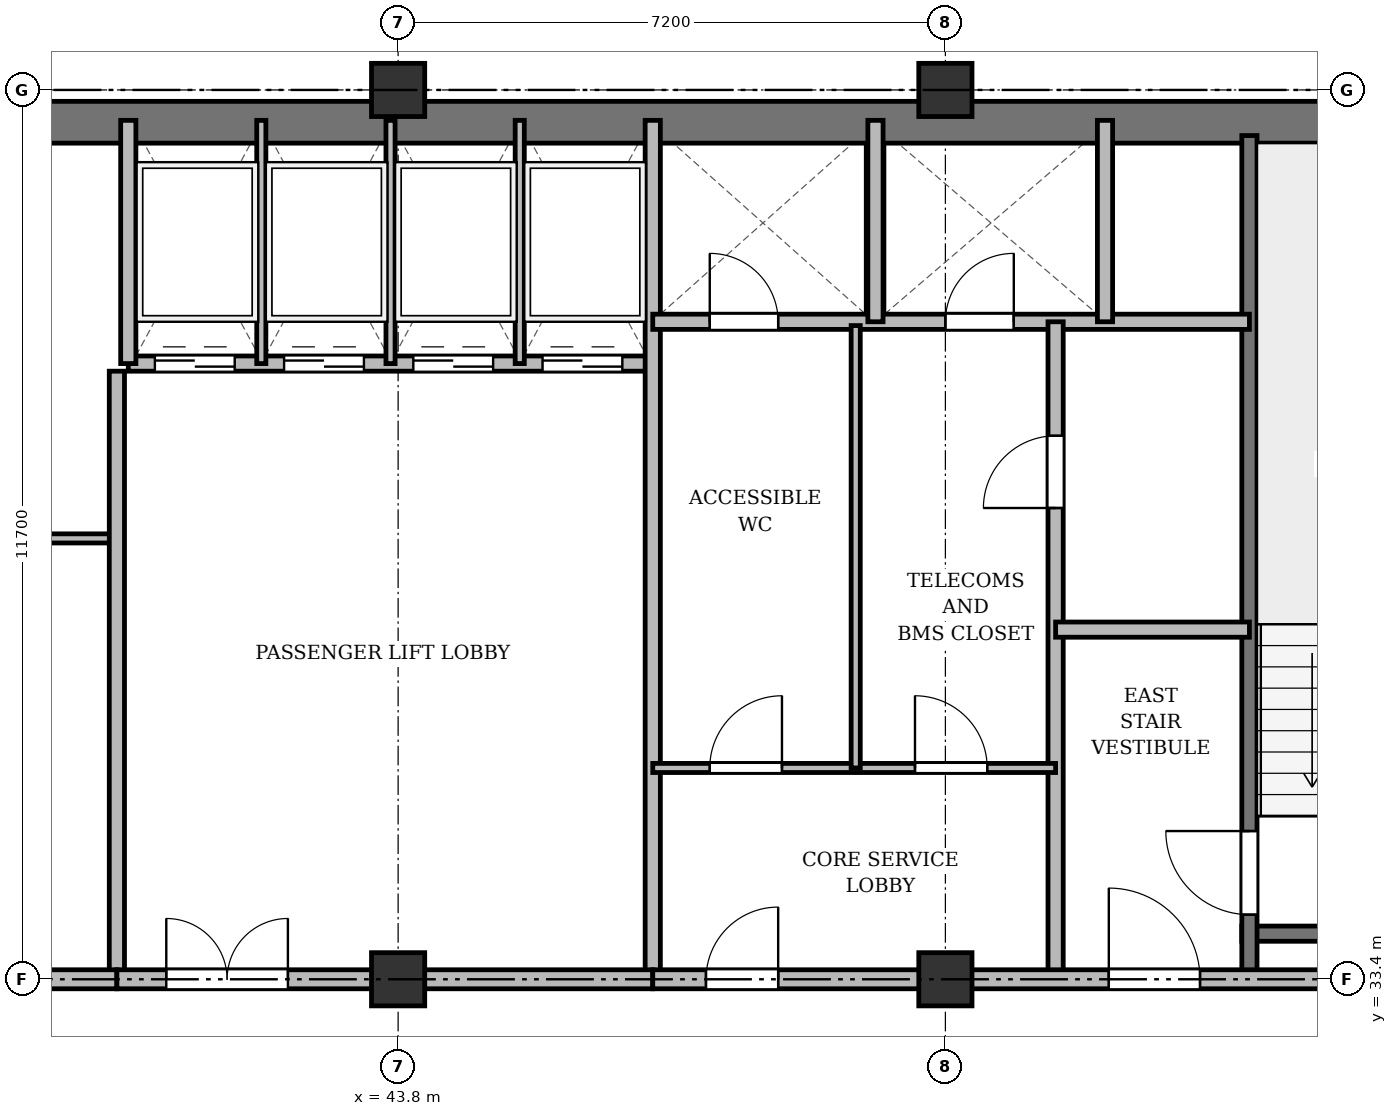
"""IFC4 building model, lengths in metres.
Left out: names, types, materials, properties, quantities, classifications, styles, units other than length and angle.
Written with IfcOpenShell. Run it as: python <this file> out.ifc"""

import sys

from ifc_helpers import new_model, si_unit, direction, frame, frame_2d, origin, origin_2d, place, context, subcontext, project, spatial, rectangle, extrude, source, transform, mapped, element, fill, save


model = new_model("IFC4")
c1 = context("Model", 3, precision=1e-05, world=origin(), true_north=direction((0.0, 1.0)))
c2 = subcontext(c1, "Body", "Model", "MODEL_VIEW")
j1 = project(units=[si_unit("LENGTHUNIT", "METRE"), si_unit("PLANEANGLEUNIT", "RADIAN")], contexts=[c1])
p1 = place(None, origin())
s1 = spatial("IfcSite", under=j1, at=p1, CompositionType="ELEMENT")
p2 = place(p1, origin())
s2 = spatial("IfcBuilding", under=s1, at=p2, CompositionType="ELEMENT")
p3 = place(p2, frame((0.0, 0.0, 233.7)))
s3 = spatial("IfcBuildingStorey", under=s2, at=p3, CompositionType="ELEMENT", Elevation=233.7)
m1 = source(origin(), c2, "Body", "SweptSolid", [
    extrude(rectangle(XDim=0.7, YDim=0.7, at=origin_2d()), origin(), (0.0, 0.0, 1.0), 3.6),
])
for number, where, z_axis, x_axis in (
    (1, (43.8, 33.4, 0.0), (0.0, 0.0, 1.0), (1.0, 0.0, 0.0)),
    (2, (43.8, 45.1, 0.0), (0.0, 0.0, 1.0), (1.0, 0.0, 0.0)),
    (3, (51.0, 33.4, 0.0), (0.0, 0.0, 1.0), (1.0, 0.0, 0.0)),
    (4, (51.0, 45.1, 0.0), (0.0, 0.0, 1.0), (1.0, 0.0, 0.0)),
):
    element("IfcColumn", number, at=place(p3, frame(where, z_axis=z_axis, x_axis=x_axis)), inside=s3, PredefinedType="COLUMN", context=c2, shape_type="MappedRepresentation", body=[
        mapped(m1, transform((0.0, 0.0, 0.0), x_axis=(1.0, 0.0, 0.0), y_axis=(0.0, 1.0, 0.0), z_axis=(0.0, 0.0, 1.0), scale=1.0)),
    ])
p4 = place(p3, frame((15.65, 44.675, 0.0), z_axis=(0.0, 0.0, 1.0), x_axis=(1.0, 0.0, 0.0)))
e5 = element("IfcWall", 5, at=p4, inside=s3, PredefinedType="SHEAR", context=c2, shape_type="SweptSolid", body=[
    extrude(rectangle(XDim=43.1, YDim=0.55, at=frame_2d((21.55, 0.0))), origin(), (0.0, 0.0, 1.0), 3.36),
])
p5 = place(p3, frame((54.9, 34.0, 0.0), z_axis=(0.0, 0.0, 1.0), x_axis=(1.0, 0.0, 0.0)))
e6 = element("IfcWall", 6, at=p5, inside=s3, PredefinedType="SHEAR", context=c2, shape_type="SweptSolid", body=[
    extrude(rectangle(XDim=3.4, YDim=0.2, at=frame_2d((1.7, 0.0))), origin(), (0.0, 0.0, 1.0), 3.36),
])
p6 = place(p3, frame((55.0, 33.4, 0.0), z_axis=(0.0, 0.0, 1.0), x_axis=(0.0, 1.0, 0.0)))
e7 = element("IfcWall", 7, at=p6, inside=s3, PredefinedType="SHEAR", context=c2, shape_type="SweptSolid", body=[
    extrude(rectangle(XDim=11.1, YDim=0.2, at=frame_2d((5.55, 0.0))), origin(), (0.0, 0.0, 1.0), 3.36),
])
p7 = place(p6, frame((0.85, 0.0, 0.0)))
e8 = element("IfcOpeningElement", 8, at=p7, cuts=e7, PredefinedType="OPENING", context=c2, shape_type="SweptSolid", body=[
    extrude(rectangle(XDim=1.1, YDim=2.15, at=frame_2d((0.55, 1.075))), frame((0.0, 0.11, 0.0), z_axis=(0.0, -1.0, 0.0), x_axis=(1.0, 0.0, 0.0)), (0.0, 0.0, 1.0), 0.22),
])
p8 = place(p3, frame((33.3, 39.2, 0.0), z_axis=(0.0, 0.0, 1.0), x_axis=(1.0, 0.0, 0.0)))
e9 = element("IfcWall", 9, at=p8, inside=s3, PredefinedType="PARTITIONING", context=c2, shape_type="SweptSolid", body=[
    extrude(rectangle(XDim=6.8, YDim=0.12, at=frame_2d((3.4, 0.0))), origin(), (0.0, 0.0, 1.0), 3.36),
])
p9 = place(p8, frame((2.6, 0.0, 0.0)))
e10 = element("IfcOpeningElement", 10, at=p9, cuts=e9, PredefinedType="OPENING", context=c2, shape_type="SweptSolid", body=[
    extrude(rectangle(XDim=0.95, YDim=2.15, at=frame_2d((0.475, 1.075))), frame((0.0, 0.07, 0.0), z_axis=(0.0, -1.0, 0.0), x_axis=(1.0, 0.0, 0.0)), (0.0, 0.0, 1.0), 0.14),
])
p10 = place(p3, frame((40.1, 33.4, 0.0), z_axis=(0.0, 0.0, 1.0), x_axis=(0.0, 1.0, 0.0)))
e11 = element("IfcWall", 11, at=p10, inside=s3, PredefinedType="SOLIDWALL", context=c2, shape_type="SweptSolid", body=[
    extrude(rectangle(XDim=8.0, YDim=0.2, at=frame_2d((4.0, 0.0))), origin(), (0.0, 0.0, 1.0), 2.91),
])
p11 = place(p3, frame((40.25, 41.5, 0.0), z_axis=(0.0, 0.0, 1.0), x_axis=(1.0, 0.0, 0.0)))
e12 = element("IfcWall", 12, at=p11, inside=s3, PredefinedType="SOLIDWALL", context=c2, shape_type="SweptSolid", body=[
    extrude(rectangle(XDim=6.9, YDim=0.2, at=frame_2d((3.45, 0.0))), origin(), (0.0, 0.0, 1.0), 3.36),
])
p12 = place(p11, frame((0.35, 0.0, 0.0)))
e13 = element("IfcOpeningElement", 13, at=p12, cuts=e12, PredefinedType="OPENING", context=c2, shape_type="SweptSolid", body=[
    extrude(rectangle(XDim=1.05, YDim=2.15, at=frame_2d((0.525, 1.075))), frame((0.0, 0.11, 0.0), z_axis=(0.0, -1.0, 0.0), x_axis=(1.0, 0.0, 0.0)), (0.0, 0.0, 1.0), 0.22),
])
p13 = place(p11, frame((2.05, 0.0, 0.0)))
e14 = element("IfcOpeningElement", 14, at=p13, cuts=e12, PredefinedType="OPENING", context=c2, shape_type="SweptSolid", body=[
    extrude(rectangle(XDim=1.05, YDim=2.15, at=frame_2d((0.525, 1.075))), frame((0.0, 0.11, 0.0), z_axis=(0.0, -1.0, 0.0), x_axis=(1.0, 0.0, 0.0)), (0.0, 0.0, 1.0), 0.22),
])
p14 = place(p11, frame((3.75, 0.0, 0.0)))
e15 = element("IfcOpeningElement", 15, at=p14, cuts=e12, PredefinedType="OPENING", context=c2, shape_type="SweptSolid", body=[
    extrude(rectangle(XDim=1.05, YDim=2.15, at=frame_2d((0.525, 1.075))), frame((0.0, 0.11, 0.0), z_axis=(0.0, -1.0, 0.0), x_axis=(1.0, 0.0, 0.0)), (0.0, 0.0, 1.0), 0.22),
])
p15 = place(p11, frame((5.45, 0.0, 0.0)))
e16 = element("IfcOpeningElement", 16, at=p15, cuts=e12, PredefinedType="OPENING", context=c2, shape_type="SweptSolid", body=[
    extrude(rectangle(XDim=1.05, YDim=2.15, at=frame_2d((0.525, 1.075))), frame((0.0, 0.11, 0.0), z_axis=(0.0, -1.0, 0.0), x_axis=(1.0, 0.0, 0.0)), (0.0, 0.0, 1.0), 0.22),
])
p16 = place(p3, frame((40.25, 41.5, 0.0), z_axis=(0.0, 0.0, 1.0), x_axis=(0.0, 1.0, 0.0)))
e17 = element("IfcWall", 17, at=p16, inside=s3, PredefinedType="SOLIDWALL", context=c2, shape_type="SweptSolid", body=[
    extrude(rectangle(XDim=3.2, YDim=0.2, at=frame_2d((1.6, 0.0))), origin(), (0.0, 0.0, 1.0), 3.36),
])
for number, where, z_axis, x_axis in (
    (18, (42.0, 41.5, 0.0), (0.0, 0.0, 1.0), (0.0, 1.0, 0.0)),
    (19, (43.7, 41.5, 0.0), (0.0, 0.0, 1.0), (0.0, 1.0, 0.0)),
    (20, (45.4, 41.5, 0.0), (0.0, 0.0, 1.0), (0.0, 1.0, 0.0)),
):
    element("IfcWall", number, at=place(p3, frame(where, z_axis=z_axis, x_axis=x_axis)), inside=s3, PredefinedType="PARTITIONING", context=c2, shape_type="SweptSolid", body=[
        extrude(rectangle(XDim=3.2, YDim=0.12, at=frame_2d((1.6, 0.0))), origin(), (0.0, 0.0, 1.0), 3.36),
    ])
p17 = place(p3, frame((47.15, 33.4, 0.0), z_axis=(0.0, 0.0, 1.0), x_axis=(0.0, 1.0, 0.0)))
e21 = element("IfcWall", 21, at=p17, inside=s3, PredefinedType="SOLIDWALL", context=c2, shape_type="SweptSolid", body=[
    extrude(rectangle(XDim=11.3, YDim=0.2, at=frame_2d((5.65, 0.0))), origin(), (0.0, 0.0, 1.0), 2.91),
])
p18 = place(p3, frame((33.3, 33.4, 0.0), z_axis=(0.0, 0.0, 1.0), x_axis=(1.0, 0.0, 0.0)))
e22 = element("IfcWall", 22, at=p18, inside=s3, PredefinedType="PARTITIONING", context=c2, shape_type="SweptSolid", body=[
    extrude(rectangle(XDim=6.8, YDim=0.25, at=frame_2d((3.4, 0.0))), origin(), (0.0, 0.0, 1.0), 2.91),
])
p19 = place(p18, frame((2.4, 0.0, 0.0)))
e23 = element("IfcOpeningElement", 23, at=p19, cuts=e22, PredefinedType="OPENING", context=c2, shape_type="SweptSolid", body=[
    extrude(rectangle(XDim=1.0, YDim=2.15, at=frame_2d((0.5, 1.075))), frame((0.0, 0.135, 0.0), z_axis=(0.0, -1.0, 0.0), x_axis=(1.0, 0.0, 0.0)), (0.0, 0.0, 1.0), 0.27),
])
p20 = place(p3, frame((40.1, 33.4, 0.0), z_axis=(0.0, 0.0, 1.0), x_axis=(1.0, 0.0, 0.0)))
e24 = element("IfcWall", 24, at=p20, inside=s3, PredefinedType="PARTITIONING", context=c2, shape_type="SweptSolid", body=[
    extrude(rectangle(XDim=7.05, YDim=0.25, at=frame_2d((3.525, 0.0))), origin(), (0.0, 0.0, 1.0), 2.91),
])
p21 = place(p20, frame((0.65, 0.0, 0.0)))
e25 = element("IfcOpeningElement", 25, at=p21, cuts=e24, PredefinedType="OPENING", context=c2, shape_type="SweptSolid", body=[
    extrude(rectangle(XDim=1.6, YDim=2.2, at=frame_2d((0.8, 1.1))), frame((0.0, 0.135, 0.0), z_axis=(0.0, -1.0, 0.0), x_axis=(1.0, 0.0, 0.0)), (0.0, 0.0, 1.0), 0.27),
])
p22 = place(p3, frame((47.15, 42.05, 0.0), z_axis=(0.0, 0.0, 1.0), x_axis=(1.0, 0.0, 0.0)))
e26 = element("IfcWall", 26, at=p22, inside=s3, PredefinedType="SOLIDWALL", context=c2, shape_type="SweptSolid", body=[
    extrude(rectangle(XDim=7.85, YDim=0.2, at=frame_2d((3.925, 0.0))), origin(), (0.0, 0.0, 1.0), 2.86),
])
p23 = place(p22, frame((0.75, 0.0, 0.0)))
e27 = element("IfcOpeningElement", 27, at=p23, cuts=e26, PredefinedType="OPENING", context=c2, shape_type="SweptSolid", body=[
    extrude(rectangle(XDim=0.9, YDim=2.1, at=frame_2d((0.45, 1.05))), frame((0.0, 0.11, 0.0), z_axis=(0.0, -1.0, 0.0), x_axis=(1.0, 0.0, 0.0)), (0.0, 0.0, 1.0), 0.22),
])
p24 = place(p22, frame((3.85, 0.0, 0.0)))
e28 = element("IfcOpeningElement", 28, at=p24, cuts=e26, PredefinedType="OPENING", context=c2, shape_type="SweptSolid", body=[
    extrude(rectangle(XDim=0.9, YDim=2.1, at=frame_2d((0.45, 1.05))), frame((0.0, 0.11, 0.0), z_axis=(0.0, -1.0, 0.0), x_axis=(1.0, 0.0, 0.0)), (0.0, 0.0, 1.0), 0.22),
])
for number, where, z_axis, x_axis in (
    (29, (50.08, 42.05, 0.0), (0.0, 0.0, 1.0), (0.0, 1.0, 0.0)),
    (30, (53.1, 42.05, 0.0), (0.0, 0.0, 1.0), (0.0, 1.0, 0.0)),
):
    element("IfcWall", number, at=place(p3, frame(where, z_axis=z_axis, x_axis=x_axis)), inside=s3, PredefinedType="SOLIDWALL", context=c2, shape_type="SweptSolid", body=[
        extrude(rectangle(XDim=2.65, YDim=0.2, at=frame_2d((1.325, 0.0))), origin(), (0.0, 0.0, 1.0), 3.36),
    ])
p25 = place(p3, frame((52.45, 33.4, 0.0), z_axis=(0.0, 0.0, 1.0), x_axis=(0.0, 1.0, 0.0)))
e31 = element("IfcWall", 31, at=p25, inside=s3, PredefinedType="PARTITIONING", context=c2, shape_type="SweptSolid", body=[
    extrude(rectangle(XDim=8.65, YDim=0.2, at=frame_2d((4.325, 0.0))), origin(), (0.0, 0.0, 1.0), 2.91),
])
p26 = place(p25, frame((6.2, 0.0, 0.0)))
e32 = element("IfcOpeningElement", 32, at=p26, cuts=e31, PredefinedType="OPENING", context=c2, shape_type="SweptSolid", body=[
    extrude(rectangle(XDim=0.95, YDim=2.15, at=frame_2d((0.475, 1.075))), frame((0.0, 0.11, 0.0), z_axis=(0.0, -1.0, 0.0), x_axis=(1.0, 0.0, 0.0)), (0.0, 0.0, 1.0), 0.22),
])
p27 = place(p3, frame((52.45, 38.0, 0.0), z_axis=(0.0, 0.0, 1.0), x_axis=(1.0, 0.0, 0.0)))
e33 = element("IfcWall", 33, at=p27, inside=s3, PredefinedType="PARTITIONING", context=c2, shape_type="SweptSolid", body=[
    extrude(rectangle(XDim=2.55, YDim=0.2, at=frame_2d((1.275, 0.0))), origin(), (0.0, 0.0, 1.0), 3.36),
])
p28 = place(p3, frame((47.15, 36.18, 0.0), z_axis=(0.0, 0.0, 1.0), x_axis=(1.0, 0.0, 0.0)))
e34 = element("IfcWall", 34, at=p28, inside=s3, PredefinedType="PARTITIONING", context=c2, shape_type="SweptSolid", body=[
    extrude(rectangle(XDim=5.3, YDim=0.12, at=frame_2d((2.65, 0.0))), origin(), (0.0, 0.0, 1.0), 2.86),
])
p29 = place(p28, frame((0.75, 0.0, 0.0)))
e35 = element("IfcOpeningElement", 35, at=p29, cuts=e34, PredefinedType="OPENING", context=c2, shape_type="SweptSolid", body=[
    extrude(rectangle(XDim=0.95, YDim=2.15, at=frame_2d((0.475, 1.075))), frame((0.0, 0.07, 0.0), z_axis=(0.0, -1.0, 0.0), x_axis=(1.0, 0.0, 0.0)), (0.0, 0.0, 1.0), 0.14),
])
p30 = place(p28, frame((3.45, 0.0, 0.0)))
e36 = element("IfcOpeningElement", 36, at=p30, cuts=e34, PredefinedType="OPENING", context=c2, shape_type="SweptSolid", body=[
    extrude(rectangle(XDim=0.95, YDim=2.15, at=frame_2d((0.475, 1.075))), frame((0.0, 0.07, 0.0), z_axis=(0.0, -1.0, 0.0), x_axis=(1.0, 0.0, 0.0)), (0.0, 0.0, 1.0), 0.14),
])
p31 = place(p3, frame((49.82, 36.18, 0.0), z_axis=(0.0, 0.0, 1.0), x_axis=(0.0, 1.0, 0.0)))
e37 = element("IfcWall", 37, at=p31, inside=s3, PredefinedType="PARTITIONING", context=c2, shape_type="SweptSolid", body=[
    extrude(rectangle(XDim=5.82, YDim=0.12, at=frame_2d((2.91, 0.0))), origin(), (0.0, 0.0, 1.0), 3.36),
])
p32 = place(p3, frame((47.15, 33.4, 0.0), z_axis=(0.0, 0.0, 1.0), x_axis=(1.0, 0.0, 0.0)))
e38 = element("IfcWall", 38, at=p32, inside=s3, PredefinedType="PARTITIONING", context=c2, shape_type="SweptSolid", body=[
    extrude(rectangle(XDim=11.15, YDim=0.25, at=frame_2d((5.575, 0.0))), origin(), (0.0, 0.0, 1.0), 2.91),
])
p33 = place(p32, frame((0.7, 0.0, 0.0)))
e39 = element("IfcOpeningElement", 39, at=p33, cuts=e38, PredefinedType="OPENING", context=c2, shape_type="SweptSolid", body=[
    extrude(rectangle(XDim=0.95, YDim=2.15, at=frame_2d((0.475, 1.075))), frame((0.0, 0.135, 0.0), z_axis=(0.0, -1.0, 0.0), x_axis=(1.0, 0.0, 0.0)), (0.0, 0.0, 1.0), 0.27),
])
p34 = place(p32, frame((6.0, 0.0, 0.0)))
e40 = element("IfcOpeningElement", 40, at=p34, cuts=e38, PredefinedType="OPENING", context=c2, shape_type="SweptSolid", body=[
    extrude(rectangle(XDim=1.2, YDim=2.15, at=frame_2d((0.6, 1.075))), frame((0.0, 0.135, 0.0), z_axis=(0.0, -1.0, 0.0), x_axis=(1.0, 0.0, 0.0)), (0.0, 0.0, 1.0), 0.27),
])
m2 = source(origin(), c2, "Body", "SweptSolid", [
    extrude(rectangle(XDim=1.1, YDim=2.15, at=frame_2d((0.55, 1.075))), frame((0.0, 0.025, 0.0), z_axis=(0.0, -1.0, 0.0), x_axis=(1.0, 0.0, 0.0)), (0.0, 0.0, 1.0), 0.05),
])
p35 = place(p7, origin())
e41 = element("IfcDoor", 41, at=p35, inside=s3, OperationType="SINGLE_SWING_RIGHT", PredefinedType="DOOR", context=c2, shape_type="MappedRepresentation", body=[
    mapped(m2, transform((0.0, 0.0, 0.0), x_axis=(1.0, 0.0, 0.0), y_axis=(0.0, 1.0, 0.0), z_axis=(0.0, 0.0, 1.0), scale=1.0)),
])
fill(e8, e41)
m3 = source(origin(), c2, "Body", "SweptSolid", [
    extrude(rectangle(XDim=1.05, YDim=2.15, at=frame_2d((0.525, 1.075))), frame((0.0, 0.025, 0.0), z_axis=(0.0, -1.0, 0.0), x_axis=(1.0, 0.0, 0.0)), (0.0, 0.0, 1.0), 0.05),
])
p36 = place(p12, origin())
e42 = element("IfcDoor", 42, at=p36, inside=s3, OperationType="DOUBLE_DOOR_SLIDING", PredefinedType="DOOR", context=c2, shape_type="MappedRepresentation", body=[
    mapped(m3, transform((0.0, 0.0, 0.0), x_axis=(1.0, 0.0, 0.0), y_axis=(0.0, 1.0, 0.0), z_axis=(0.0, 0.0, 1.0), scale=1.0)),
])
fill(e13, e42)
p37 = place(p13, origin())
e43 = element("IfcDoor", 43, at=p37, inside=s3, OperationType="DOUBLE_DOOR_SLIDING", PredefinedType="DOOR", context=c2, shape_type="MappedRepresentation", body=[
    mapped(m3, transform((0.0, 0.0, 0.0), x_axis=(1.0, 0.0, 0.0), y_axis=(0.0, 1.0, 0.0), z_axis=(0.0, 0.0, 1.0), scale=1.0)),
])
fill(e14, e43)
p38 = place(p14, origin())
e44 = element("IfcDoor", 44, at=p38, inside=s3, OperationType="DOUBLE_DOOR_SLIDING", PredefinedType="DOOR", context=c2, shape_type="MappedRepresentation", body=[
    mapped(m3, transform((0.0, 0.0, 0.0), x_axis=(1.0, 0.0, 0.0), y_axis=(0.0, 1.0, 0.0), z_axis=(0.0, 0.0, 1.0), scale=1.0)),
])
fill(e15, e44)
p39 = place(p15, origin())
e45 = element("IfcDoor", 45, at=p39, inside=s3, OperationType="DOUBLE_DOOR_SLIDING", PredefinedType="DOOR", context=c2, shape_type="MappedRepresentation", body=[
    mapped(m3, transform((0.0, 0.0, 0.0), x_axis=(1.0, 0.0, 0.0), y_axis=(0.0, 1.0, 0.0), z_axis=(0.0, 0.0, 1.0), scale=1.0)),
])
fill(e16, e45)
m4 = source(origin(), c2, "Body", "SweptSolid", [
    extrude(rectangle(XDim=1.6, YDim=2.2, at=frame_2d((0.8, 1.1))), frame((0.0, 0.025, 0.0), z_axis=(0.0, -1.0, 0.0), x_axis=(1.0, 0.0, 0.0)), (0.0, 0.0, 1.0), 0.05),
])
p40 = place(p21, origin())
e46 = element("IfcDoor", 46, at=p40, inside=s3, OperationType="DOUBLE_DOOR_SINGLE_SWING", PredefinedType="DOOR", context=c2, shape_type="MappedRepresentation", body=[
    mapped(m4, transform((0.0, 0.0, 0.0), x_axis=(1.0, 0.0, 0.0), y_axis=(0.0, 1.0, 0.0), z_axis=(0.0, 0.0, 1.0), scale=1.0)),
])
fill(e25, e46)
m5 = source(origin(), c2, "Body", "SweptSolid", [
    extrude(rectangle(XDim=0.9, YDim=2.1, at=frame_2d((0.45, 1.05))), frame((0.0, 0.025, 0.0), z_axis=(0.0, -1.0, 0.0), x_axis=(1.0, 0.0, 0.0)), (0.0, 0.0, 1.0), 0.05),
])
p41 = place(p23, origin())
e47 = element("IfcDoor", 47, at=p41, inside=s3, OperationType="SINGLE_SWING_LEFT", PredefinedType="DOOR", context=c2, shape_type="MappedRepresentation", body=[
    mapped(m5, transform((0.0, 0.0, 0.0), x_axis=(1.0, 0.0, 0.0), y_axis=(0.0, 1.0, 0.0), z_axis=(0.0, 0.0, 1.0), scale=1.0)),
])
fill(e27, e47)
p42 = place(p24, origin())
e48 = element("IfcDoor", 48, at=p42, inside=s3, OperationType="SINGLE_SWING_RIGHT", PredefinedType="DOOR", context=c2, shape_type="MappedRepresentation", body=[
    mapped(m5, transform((0.0, 0.0, 0.0), x_axis=(1.0, 0.0, 0.0), y_axis=(0.0, 1.0, 0.0), z_axis=(0.0, 0.0, 1.0), scale=1.0)),
])
fill(e28, e48)
m6 = source(origin(), c2, "Body", "SweptSolid", [
    extrude(rectangle(XDim=0.95, YDim=2.15, at=frame_2d((0.475, 1.075))), frame((0.0, 0.025, 0.0), z_axis=(0.0, -1.0, 0.0), x_axis=(1.0, 0.0, 0.0)), (0.0, 0.0, 1.0), 0.05),
])
p43 = place(p26, origin())
e49 = element("IfcDoor", 49, at=p43, inside=s3, OperationType="SINGLE_SWING_LEFT", PredefinedType="DOOR", context=c2, shape_type="MappedRepresentation", body=[
    mapped(m6, transform((0.0, 0.0, 0.0), x_axis=(1.0, 0.0, 0.0), y_axis=(0.0, 1.0, 0.0), z_axis=(0.0, 0.0, 1.0), scale=1.0)),
])
fill(e32, e49)
p44 = place(p29, origin())
e50 = element("IfcDoor", 50, at=p44, inside=s3, OperationType="SINGLE_SWING_RIGHT", PredefinedType="DOOR", context=c2, shape_type="MappedRepresentation", body=[
    mapped(m6, transform((0.0, 0.0, 0.0), x_axis=(1.0, 0.0, 0.0), y_axis=(0.0, 1.0, 0.0), z_axis=(0.0, 0.0, 1.0), scale=1.0)),
])
fill(e35, e50)
p45 = place(p30, origin())
e51 = element("IfcDoor", 51, at=p45, inside=s3, OperationType="SINGLE_SWING_LEFT", PredefinedType="DOOR", context=c2, shape_type="MappedRepresentation", body=[
    mapped(m6, transform((0.0, 0.0, 0.0), x_axis=(1.0, 0.0, 0.0), y_axis=(0.0, 1.0, 0.0), z_axis=(0.0, 0.0, 1.0), scale=1.0)),
])
fill(e36, e51)
p46 = place(p33, origin())
e52 = element("IfcDoor", 52, at=p46, inside=s3, OperationType="SINGLE_SWING_RIGHT", PredefinedType="DOOR", context=c2, shape_type="MappedRepresentation", body=[
    mapped(m6, transform((0.0, 0.0, 0.0), x_axis=(1.0, 0.0, 0.0), y_axis=(0.0, 1.0, 0.0), z_axis=(0.0, 0.0, 1.0), scale=1.0)),
])
fill(e39, e52)
m7 = source(origin(), c2, "Body", "SweptSolid", [
    extrude(rectangle(XDim=1.2, YDim=2.15, at=frame_2d((0.6, 1.075))), frame((0.0, 0.025, 0.0), z_axis=(0.0, -1.0, 0.0), x_axis=(1.0, 0.0, 0.0)), (0.0, 0.0, 1.0), 0.05),
])
p47 = place(p34, origin())
e53 = element("IfcDoor", 53, at=p47, inside=s3, OperationType="SINGLE_SWING_LEFT", PredefinedType="DOOR", context=c2, shape_type="MappedRepresentation", body=[
    mapped(m7, transform((0.0, 0.0, 0.0), x_axis=(1.0, 0.0, 0.0), y_axis=(0.0, 1.0, 0.0), z_axis=(0.0, 0.0, 1.0), scale=1.0)),
])
fill(e40, e53)
save(model, sys.argv[1])
